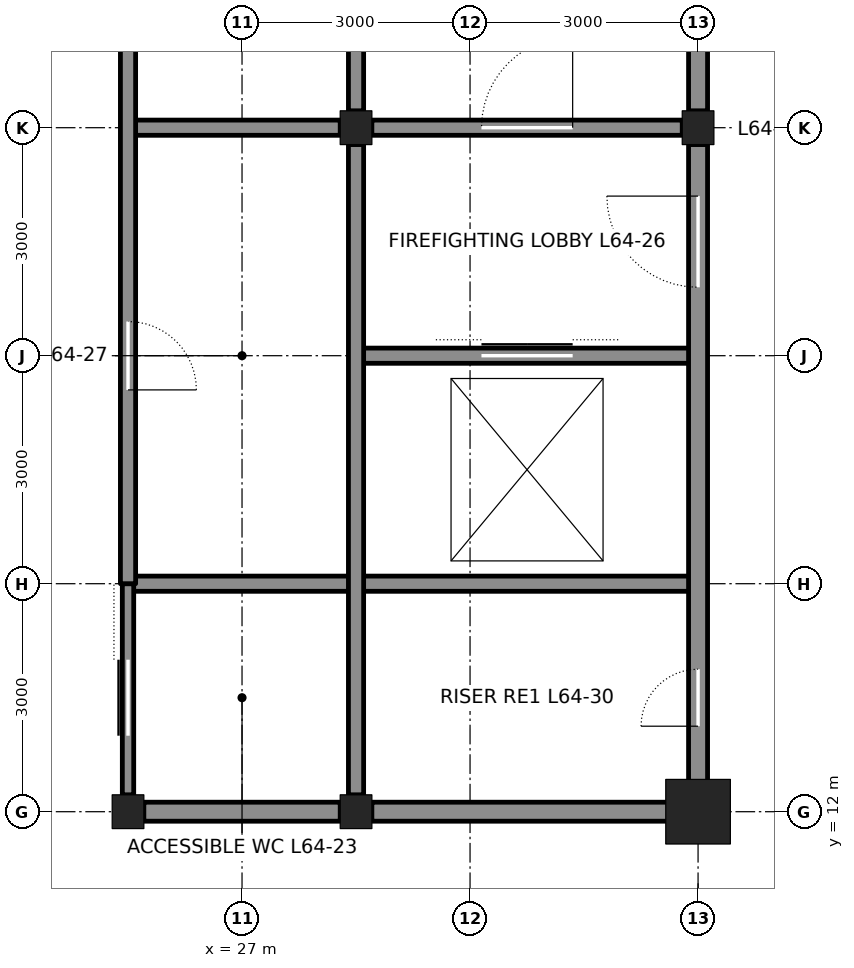
"""IFC4 building model, lengths in metres.
Left out: names, types, materials, properties, quantities, classifications, styles, units other than length and angle.
Written with IfcOpenShell. Run it as: python <this file> out.ifc"""

import sys

from ifc_helpers import new_model, si_unit, direction, frame, frame_2d, origin, origin_2d, place, context, subcontext, project, spatial, rectangle, hollow_rectangle, i_section, extrude, element, fill, save


model = new_model("IFC4")
c1 = context("Model", 3, precision=1e-05, world=origin(), true_north=direction((0.0, 1.0)))
c2 = subcontext(c1, "Body", "Model", "MODEL_VIEW")
j1 = project(units=[si_unit("LENGTHUNIT", "METRE"), si_unit("PLANEANGLEUNIT", "RADIAN")], contexts=[c1])
p1 = place(None, origin())
s1 = spatial("IfcSite", under=j1, at=p1, CompositionType="ELEMENT")
p2 = place(p1, origin())
s2 = spatial("IfcBuilding", under=s1, at=p2, CompositionType="ELEMENT")
p3 = place(p2, frame((0.0, 0.0, 287.4)))
s3 = spatial("IfcBuildingStorey", under=s2, at=p3, CompositionType="ELEMENT", Elevation=287.4)
for number, where, z_axis, x_axis in (
    (1, (25.5, 12.0, 0.0), (0.0, 0.0, 1.0), (1.0, 0.0, 0.0)),
    (2, (28.5, 12.0, 0.0), (0.0, 0.0, 1.0), (1.0, 0.0, 0.0)),
):
    element("IfcColumn", number, at=place(p3, frame(where, z_axis=z_axis, x_axis=x_axis)), inside=s3, PredefinedType="COLUMN", context=c2, shape_type="SweptSolid", body=[
        extrude(i_section(OverallWidth=0.417, OverallDepth=0.445, WebThickness=0.039, FlangeThickness=0.063, at=origin_2d()), origin(), (0.0, 0.0, 1.0), 4.2),
    ])
p4 = place(p3, frame((33.0, 12.0, 0.0), z_axis=(0.0, 0.0, 1.0), x_axis=(1.0, 0.0, 0.0)))
e3 = element("IfcColumn", 3, at=p4, inside=s3, PredefinedType="COLUMN", context=c2, shape_type="SweptSolid", body=[
    extrude(hollow_rectangle(XDim=0.85, YDim=0.85, WallThickness=0.085, at=origin_2d()), origin(), (0.0, 0.0, 1.0), 4.2),
])
for number, where, z_axis, x_axis in (
    (4, (33.0, 21.0, 0.0), (0.0, 0.0, 1.0), (1.0, 0.0, 0.0)),
    (5, (28.5, 21.0, 0.0), (0.0, 0.0, 1.0), (1.0, 0.0, 0.0)),
):
    element("IfcColumn", number, at=place(p3, frame(where, z_axis=z_axis, x_axis=x_axis)), inside=s3, PredefinedType="COLUMN", context=c2, shape_type="SweptSolid", body=[
        extrude(i_section(OverallWidth=0.417, OverallDepth=0.445, WebThickness=0.039, FlangeThickness=0.063, at=origin_2d()), origin(), (0.0, 0.0, 1.0), 4.2),
    ])
p5 = place(p3, frame((25.708, 12.0, 0.0), z_axis=(0.0, 0.0, 1.0), x_axis=(1.0, 0.0, 0.0)))
e6 = element("IfcWall", 6, at=p5, inside=s3, PredefinedType="SOLIDWALL", context=c2, shape_type="SweptSolid", body=[
    extrude(rectangle(XDim=2.583, YDim=0.25, at=frame_2d((1.292, 0.0))), origin(), (0.0, 0.0, 1.0), 3.182),
])
p6 = place(p3, frame((28.708, 12.0, 0.0), z_axis=(0.0, 0.0, 1.0), x_axis=(1.0, 0.0, 0.0)))
e7 = element("IfcWall", 7, at=p6, inside=s3, PredefinedType="SOLIDWALL", context=c2, shape_type="SweptSolid", body=[
    extrude(rectangle(XDim=4.042, YDim=0.25, at=frame_2d((2.021, 0.0))), origin(), (0.0, 0.0, 1.0), 3.182),
])
p7 = place(p3, frame((25.5, 15.0, 0.0), z_axis=(0.0, 0.0, 1.0), x_axis=(1.0, 0.0, 0.0)))
e8 = element("IfcWall", 8, at=p7, inside=s3, PredefinedType="SOLIDWALL", context=c2, shape_type="SweptSolid", body=[
    extrude(rectangle(XDim=7.5, YDim=0.2, at=frame_2d((3.75, 0.0))), origin(), (0.0, 0.0, 1.0), 4.04),
])
p8 = place(p3, frame((28.5, 18.0, 0.0), z_axis=(0.0, 0.0, 1.0), x_axis=(1.0, 0.0, 0.0)))
e9 = element("IfcWall", 9, at=p8, inside=s3, PredefinedType="SOLIDWALL", context=c2, shape_type="SweptSolid", body=[
    extrude(rectangle(XDim=4.5, YDim=0.2, at=frame_2d((2.25, 0.0))), origin(), (0.0, 0.0, 1.0), 4.04),
])
p9 = place(p8, frame((1.65, 0.0, 0.0)))
e10 = element("IfcOpeningElement", 10, at=p9, cuts=e9, PredefinedType="OPENING", context=c2, shape_type="SweptSolid", body=[
    extrude(rectangle(XDim=1.2, YDim=2.1, at=frame_2d((0.6, 1.05))), frame((0.0, 0.11, 0.0), z_axis=(0.0, -1.0, 0.0), x_axis=(1.0, 0.0, 0.0)), (0.0, 0.0, 1.0), 0.22),
])
p10 = place(p3, frame((25.5, 21.0, 0.0), z_axis=(0.0, 0.0, 1.0), x_axis=(1.0, 0.0, 0.0)))
e11 = element("IfcWall", 11, at=p10, inside=s3, PredefinedType="SOLIDWALL", context=c2, shape_type="SweptSolid", body=[
    extrude(rectangle(XDim=2.792, YDim=0.2, at=frame_2d((1.396, 0.0))), origin(), (0.0, 0.0, 1.0), 3.09),
])
p11 = place(p3, frame((28.708, 21.0, 0.0), z_axis=(0.0, 0.0, 1.0), x_axis=(1.0, 0.0, 0.0)))
e12 = element("IfcWall", 12, at=p11, inside=s3, PredefinedType="SOLIDWALL", context=c2, shape_type="SweptSolid", body=[
    extrude(rectangle(XDim=4.083, YDim=0.2, at=frame_2d((2.042, 0.0))), origin(), (0.0, 0.0, 1.0), 3.09),
])
p12 = place(p11, frame((1.442, 0.0, 0.0)))
e13 = element("IfcOpeningElement", 13, at=p12, cuts=e12, PredefinedType="OPENING", context=c2, shape_type="SweptSolid", body=[
    extrude(rectangle(XDim=1.2, YDim=2.1, at=frame_2d((0.6, 1.05))), frame((0.0, 0.11, 0.0), z_axis=(0.0, -1.0, 0.0), x_axis=(1.0, 0.0, 0.0)), (0.0, 0.0, 1.0), 0.22),
])
p13 = place(p3, frame((25.5, 12.222, 0.0), z_axis=(0.0, 0.0, 1.0), x_axis=(0.0, 1.0, 0.0)))
e14 = element("IfcWall", 14, at=p13, inside=s3, PredefinedType="PARTITIONING", context=c2, shape_type="SweptSolid", body=[
    extrude(rectangle(XDim=2.778, YDim=0.15, at=frame_2d((1.389, 0.0))), origin(), (0.0, 0.0, 1.0), 3.065),
])
p14 = place(p13, frame((0.778, 0.0, 0.0)))
e15 = element("IfcOpeningElement", 15, at=p14, cuts=e14, PredefinedType="OPENING", context=c2, shape_type="SweptSolid", body=[
    extrude(rectangle(XDim=1.0, YDim=2.1, at=frame_2d((0.5, 1.05))), frame((0.0, 0.085, 0.0), z_axis=(0.0, -1.0, 0.0), x_axis=(1.0, 0.0, 0.0)), (0.0, 0.0, 1.0), 0.17),
])
p15 = place(p3, frame((25.5, 15.0, 0.0), z_axis=(0.0, 0.0, 1.0), x_axis=(0.0, 1.0, 0.0)))
e16 = element("IfcWall", 16, at=p15, inside=s3, PredefinedType="SOLIDWALL", context=c2, shape_type="SweptSolid", body=[
    extrude(rectangle(XDim=12.0, YDim=0.2, at=frame_2d((6.0, 0.0))), origin(), (0.0, 0.0, 1.0), 3.065),
])
p16 = place(p15, frame((2.55, 0.0, 0.0)))
e17 = element("IfcOpeningElement", 17, at=p16, cuts=e16, PredefinedType="OPENING", context=c2, shape_type="SweptSolid", body=[
    extrude(rectangle(XDim=0.9, YDim=2.1, at=frame_2d((0.45, 1.05))), frame((0.0, 0.11, 0.0), z_axis=(0.0, -1.0, 0.0), x_axis=(1.0, 0.0, 0.0)), (0.0, 0.0, 1.0), 0.22),
])
p17 = place(p3, frame((28.5, 12.222, 0.0), z_axis=(0.0, 0.0, 1.0), x_axis=(0.0, 1.0, 0.0)))
e18 = element("IfcWall", 18, at=p17, inside=s3, PredefinedType="SOLIDWALL", context=c2, shape_type="SweptSolid", body=[
    extrude(rectangle(XDim=8.555, YDim=0.2, at=frame_2d((4.278, 0.0))), origin(), (0.0, 0.0, 1.0), 3.113),
])
p18 = place(p3, frame((28.5, 21.222, 0.0), z_axis=(0.0, 0.0, 1.0), x_axis=(0.0, 1.0, 0.0)))
e19 = element("IfcWall", 19, at=p18, inside=s3, PredefinedType="SOLIDWALL", context=c2, shape_type="SweptSolid", body=[
    extrude(rectangle(XDim=2.555, YDim=0.2, at=frame_2d((1.278, 0.0))), origin(), (0.0, 0.0, 1.0), 3.113),
])
p19 = place(p3, frame((33.0, 12.25, 0.0), z_axis=(0.0, 0.0, 1.0), x_axis=(0.0, 1.0, 0.0)))
e20 = element("IfcWall", 20, at=p19, inside=s3, PredefinedType="SOLIDWALL", context=c2, shape_type="SweptSolid", body=[
    extrude(rectangle(XDim=8.528, YDim=0.25, at=frame_2d((4.264, 0.0))), origin(), (0.0, 0.0, 1.0), 3.113),
])
p20 = place(p19, frame((6.65, 0.0, 0.0)))
e21 = element("IfcOpeningElement", 21, at=p20, cuts=e20, PredefinedType="OPENING", context=c2, shape_type="SweptSolid", body=[
    extrude(rectangle(XDim=1.2, YDim=2.1, at=frame_2d((0.6, 1.05))), frame((0.0, 0.135, 0.0), z_axis=(0.0, -1.0, 0.0), x_axis=(1.0, 0.0, 0.0)), (0.0, 0.0, 1.0), 0.27),
])
p21 = place(p19, frame((0.875, 0.0, 0.0)))
e22 = element("IfcOpeningElement", 22, at=p21, cuts=e20, PredefinedType="OPENING", context=c2, shape_type="SweptSolid", body=[
    extrude(rectangle(XDim=0.75, YDim=2.1, at=frame_2d((0.375, 1.05))), frame((0.0, 0.135, 0.0), z_axis=(0.0, -1.0, 0.0), x_axis=(1.0, 0.0, 0.0)), (0.0, 0.0, 1.0), 0.27),
])
p22 = place(p3, frame((33.0, 21.222, 0.0), z_axis=(0.0, 0.0, 1.0), x_axis=(0.0, 1.0, 0.0)))
e23 = element("IfcWall", 23, at=p22, inside=s3, PredefinedType="SOLIDWALL", context=c2, shape_type="SweptSolid", body=[
    extrude(rectangle(XDim=2.555, YDim=0.25, at=frame_2d((1.278, 0.0))), origin(), (0.0, 0.0, 1.0), 3.113),
])
p23 = place(p12, origin())
e24 = element("IfcDoor", 24, at=p23, inside=s3, OperationType="SINGLE_SWING_RIGHT", PredefinedType="DOOR", context=c2, shape_type="SweptSolid", body=[
    extrude(rectangle(XDim=1.2, YDim=2.1, at=frame_2d((0.6, 1.05))), frame((0.0, 0.025, 0.0), z_axis=(0.0, -1.0, 0.0), x_axis=(1.0, 0.0, 0.0)), (0.0, 0.0, 1.0), 0.05),
])
fill(e13, e24)
p24 = place(p20, origin())
e25 = element("IfcDoor", 25, at=p24, inside=s3, OperationType="SINGLE_SWING_RIGHT", PredefinedType="DOOR", context=c2, shape_type="SweptSolid", body=[
    extrude(rectangle(XDim=1.2, YDim=2.1, at=frame_2d((0.6, 1.05))), frame((0.0, 0.025, 0.0), z_axis=(0.0, -1.0, 0.0), x_axis=(1.0, 0.0, 0.0)), (0.0, 0.0, 1.0), 0.05),
])
fill(e21, e25)
p25 = place(p9, origin())
e26 = element("IfcDoor", 26, at=p25, inside=s3, OperationType="DOUBLE_DOOR_SLIDING", PredefinedType="DOOR", context=c2, shape_type="SweptSolid", body=[
    extrude(rectangle(XDim=1.2, YDim=2.1, at=frame_2d((0.6, 1.05))), frame((0.0, 0.025, 0.0), z_axis=(0.0, -1.0, 0.0), x_axis=(1.0, 0.0, 0.0)), (0.0, 0.0, 1.0), 0.05),
])
fill(e10, e26)
p26 = place(p21, origin())
e27 = element("IfcDoor", 27, at=p26, inside=s3, OperationType="SINGLE_SWING_LEFT", PredefinedType="DOOR", context=c2, shape_type="SweptSolid", body=[
    extrude(rectangle(XDim=0.75, YDim=2.1, at=frame_2d((0.375, 1.05))), frame((0.0, 0.025, 0.0), z_axis=(0.0, -1.0, 0.0), x_axis=(1.0, 0.0, 0.0)), (0.0, 0.0, 1.0), 0.05),
])
fill(e22, e27)
p27 = place(p14, origin())
e28 = element("IfcDoor", 28, at=p27, inside=s3, OperationType="SLIDING_TO_LEFT", PredefinedType="DOOR", context=c2, shape_type="SweptSolid", body=[
    extrude(rectangle(XDim=1.0, YDim=2.1, at=frame_2d((0.5, 1.05))), frame((0.0, 0.025, 0.0), z_axis=(0.0, -1.0, 0.0), x_axis=(1.0, 0.0, 0.0)), (0.0, 0.0, 1.0), 0.05),
])
fill(e15, e28)
p28 = place(p16, frame((0.9, 0.0, 0.0), z_axis=(0.0, 0.0, 1.0), x_axis=(-1.0, 0.0, 0.0)))
e29 = element("IfcDoor", 29, at=p28, inside=s3, OperationType="SINGLE_SWING_RIGHT", PredefinedType="DOOR", context=c2, shape_type="SweptSolid", body=[
    extrude(rectangle(XDim=0.9, YDim=2.1, at=frame_2d((0.45, 1.05))), frame((0.0, 0.025, 0.0), z_axis=(0.0, -1.0, 0.0), x_axis=(1.0, 0.0, 0.0)), (0.0, 0.0, 1.0), 0.05),
])
fill(e17, e29)
save(model, sys.argv[1])
